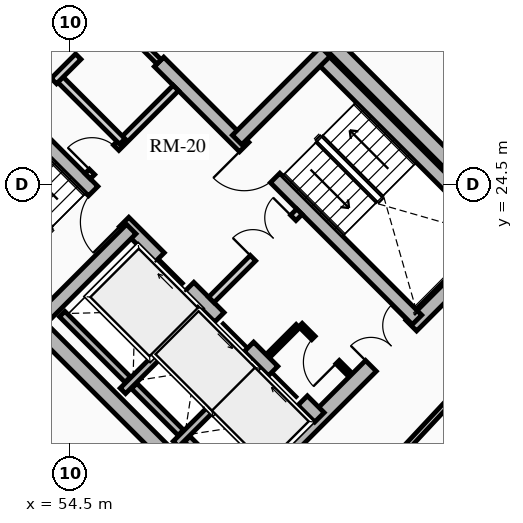
"""IFC4 building model, lengths in metres.
Left out: names, types, materials, properties, quantities, classifications, styles, units other than length and angle.
Written with IfcOpenShell. Run it as: python <this file> out.ifc"""

import sys

from ifc_helpers import new_model, si_unit, direction, frame, frame_2d, origin, place, context, subcontext, project, spatial, rectangle, extrude, source, transform, mapped, element, fill, save


model = new_model("IFC4")
c1 = context("Model", 3, precision=1e-05, world=origin(), true_north=direction((0.0, 1.0)))
c2 = subcontext(c1, "Body", "Model", "MODEL_VIEW")
j1 = project(units=[si_unit("LENGTHUNIT", "METRE"), si_unit("PLANEANGLEUNIT", "RADIAN")], contexts=[c1])
p1 = place(None, origin())
s1 = spatial("IfcSite", under=j1, at=p1, CompositionType="ELEMENT")
p2 = place(p1, origin())
s2 = spatial("IfcBuilding", under=s1, at=p2, CompositionType="ELEMENT")
p3 = place(p2, frame((0.0, 0.0, 214.12)))
s3 = spatial("IfcBuildingStorey", under=s2, at=p3, CompositionType="ELEMENT", Elevation=214.12)
for number, where, z_axis, x_axis in (
    (1, (58.702, 15.732, 0.0), (0.0, 0.0, 1.0), (-0.707, 0.707, 0.0)),
    (2, (66.268, 23.298, 0.0), (0.0, 0.0, 1.0), (-0.707, 0.707, 0.0)),
):
    element("IfcWall", number, at=place(p3, frame(where, z_axis=z_axis, x_axis=x_axis)), inside=s3, PredefinedType="SHEAR", context=c2, shape_type="SweptSolid", body=[
        extrude(rectangle(XDim=14.1, YDim=0.4, at=frame_2d((7.05, 0.0))), origin(), (0.0, 0.0, 1.0), 2.91),
    ])
p4 = place(p3, frame((58.561, 15.873, 0.0), z_axis=(0.0, 0.0, 1.0), x_axis=(0.707106781187, 0.707106781187, 0.0)))
e3 = element("IfcWall", 3, at=p4, inside=s3, PredefinedType="SHEAR", context=c2, shape_type="SweptSolid", body=[
    extrude(rectangle(XDim=10.7, YDim=0.4, at=frame_2d((5.35, 0.0))), origin(), (0.0, 0.0, 1.0), 2.91),
])
m1 = source(origin(), c2, "Body", "SweptSolid", [
    extrude(rectangle(XDim=1.5, YDim=2.02, at=frame_2d((0.75, 1.01))), frame((0.0, 0.21, 0.0), z_axis=(0.0, -1.0, 0.0), x_axis=(1.0, 0.0, 0.0)), (0.0, 0.0, 1.0), 0.42),
])
p5 = place(p4, frame((5.45, 0.0, 0.0)))
e4 = element("IfcOpeningElement", 4, at=p5, cuts=e3, PredefinedType="OPENING", context=c2, shape_type="MappedRepresentation", body=[
    mapped(m1, transform((0.0, 0.0, 0.0), x_axis=(1.0, 0.0, 0.0), y_axis=(0.0, 1.0, 0.0), z_axis=(0.0, 0.0, 1.0), scale=1.0)),
])
p6 = place(p3, frame((48.873, 25.561, 0.0), z_axis=(0.0, 0.0, 1.0), x_axis=(0.707106781187, 0.707106781187, 0.0)))
e5 = element("IfcWall", 5, at=p6, inside=s3, PredefinedType="SHEAR", context=c2, shape_type="SweptSolid", body=[
    extrude(rectangle(XDim=10.7, YDim=0.4, at=frame_2d((5.35, 0.0))), origin(), (0.0, 0.0, 1.0), 2.91),
])
p7 = place(p6, frame((4.6, 0.0, 0.0)))
e6 = element("IfcOpeningElement", 6, at=p7, cuts=e5, PredefinedType="OPENING", context=c2, shape_type="MappedRepresentation", body=[
    mapped(m1, transform((0.0, 0.0, 0.0), x_axis=(1.0, 0.0, 0.0), y_axis=(0.0, 1.0, 0.0), z_axis=(0.0, 0.0, 1.0), scale=1.0)),
])
p8 = place(p3, frame((61.06, 18.373, 0.0), z_axis=(0.0, 0.0, 1.0), x_axis=(-0.707106781187, 0.707106781187, 0.0)))
e7 = element("IfcWall", 7, at=p8, inside=s3, PredefinedType="SHEAR", context=c2, shape_type="SweptSolid", body=[
    extrude(rectangle(XDim=13.7, YDim=0.35, at=frame_2d((6.85, 0.0))), origin(), (0.0, 0.0, 1.0), 2.91),
])
m2 = source(origin(), c2, "Body", "SweptSolid", [
    extrude(rectangle(XDim=1.1, YDim=2.015, at=frame_2d((0.55, 1.007))), frame((0.0, 0.185, 0.0), z_axis=(0.0, -1.0, 0.0), x_axis=(1.0, 0.0, 0.0)), (0.0, 0.0, 1.0), 0.37),
])
p9 = place(p8, frame((4.85, 0.0, 0.0)))
e8 = element("IfcOpeningElement", 8, at=p9, cuts=e7, PredefinedType="OPENING", context=c2, shape_type="MappedRepresentation", body=[
    mapped(m2, transform((0.0, 0.0, 0.0), x_axis=(1.0, 0.0, 0.0), y_axis=(0.0, 1.0, 0.0), z_axis=(0.0, 0.0, 1.0), scale=1.0)),
])
p10 = place(p8, frame((0.625, 0.0, 0.0)))
e9 = element("IfcOpeningElement", 9, at=p10, cuts=e7, PredefinedType="OPENING", context=c2, shape_type="MappedRepresentation", body=[
    mapped(m2, transform((0.0, 0.0, 0.0), x_axis=(1.0, 0.0, 0.0), y_axis=(0.0, 1.0, 0.0), z_axis=(0.0, 0.0, 1.0), scale=1.0)),
])
p11 = place(p8, frame((2.625, 0.0, 0.0)))
e10 = element("IfcOpeningElement", 10, at=p11, cuts=e7, PredefinedType="OPENING", context=c2, shape_type="MappedRepresentation", body=[
    mapped(m2, transform((0.0, 0.0, 0.0), x_axis=(1.0, 0.0, 0.0), y_axis=(0.0, 1.0, 0.0), z_axis=(0.0, 0.0, 1.0), scale=1.0)),
])
m3 = source(origin(), c2, "Body", "SweptSolid", [
    extrude(rectangle(XDim=1.15, YDim=2.02, at=frame_2d((0.575, 1.01))), frame((0.0, 0.185, 0.0), z_axis=(0.0, -1.0, 0.0), x_axis=(1.0, 0.0, 0.0)), (0.0, 0.0, 1.0), 0.37),
])
p12 = place(p8, frame((7.27, 0.0, 0.0)))
e11 = element("IfcOpeningElement", 11, at=p12, cuts=e7, PredefinedType="OPENING", context=c2, shape_type="MappedRepresentation", body=[
    mapped(m3, transform((0.0, 0.0, 0.0), x_axis=(1.0, 0.0, 0.0), y_axis=(0.0, 1.0, 0.0), z_axis=(0.0, 0.0, 1.0), scale=1.0)),
])
p13 = place(p3, frame((63.627, 20.94, 0.0), z_axis=(0.0, 0.0, 1.0), x_axis=(-0.707119496762, 0.707094065383, 0.0)))
e12 = element("IfcWall", 12, at=p13, inside=s3, PredefinedType="SHEAR", context=c2, shape_type="SweptSolid", body=[
    extrude(rectangle(XDim=9.6, YDim=0.35, at=frame_2d((4.8, 0.0))), origin(), (0.0, 0.0, 1.0), 2.91),
])
p14 = place(p13, frame((5.28, 0.0, 0.0)))
e13 = element("IfcOpeningElement", 13, at=p14, cuts=e12, PredefinedType="OPENING", context=c2, shape_type="MappedRepresentation", body=[
    mapped(m3, transform((0.0, 0.0, 0.0), x_axis=(1.0, 0.0, 0.0), y_axis=(0.0, 1.0, 0.0), z_axis=(0.0, 0.0, 1.0), scale=1.0)),
])
p15 = place(p3, frame((53.922, 21.141, 0.0), z_axis=(0.0, 0.0, 1.0), x_axis=(-0.707106781187, 0.707106781187, 0.0)))
e14 = element("IfcWall", 14, at=p15, inside=s3, PredefinedType="SHEAR", context=c2, shape_type="SweptSolid", body=[
    extrude(rectangle(XDim=6.695, YDim=0.35, at=frame_2d((3.348, 0.0))), origin(), (0.0, 0.0, 1.0), 2.91),
])
p16 = place(p3, frame((53.784, 21.003, 0.0), z_axis=(0.0, 0.0, 1.0), x_axis=(0.707106781187, 0.707106781187, 0.0)))
e15 = element("IfcWall", 15, at=p16, inside=s3, PredefinedType="SHEAR", context=c2, shape_type="SweptSolid", body=[
    extrude(rectangle(XDim=3.285, YDim=0.35, at=frame_2d((1.643, 0.0))), origin(), (0.0, 0.0, 1.0), 2.91),
])
p17 = place(p3, frame((65.812, 23.125, 0.0), z_axis=(0.0, 0.0, 1.0), x_axis=(-0.707106781187, 0.707106781187, 0.0)))
e16 = element("IfcWall", 16, at=p17, inside=s3, PredefinedType="SHEAR", context=c2, shape_type="SweptSolid", body=[
    extrude(rectangle(XDim=6.695, YDim=0.35, at=frame_2d((3.348, 0.0))), origin(), (0.0, 0.0, 1.0), 2.91),
])
p18 = place(p3, frame((58.893, 25.674, 0.0), z_axis=(0.0, 0.0, 1.0), x_axis=(0.707106781187, 0.707106781187, 0.0)))
e17 = element("IfcWall", 17, at=p18, inside=s3, PredefinedType="SHEAR", context=c2, shape_type="SweptSolid", body=[
    extrude(rectangle(XDim=3.285, YDim=0.35, at=frame_2d((1.643, 0.0))), origin(), (0.0, 0.0, 1.0), 2.91),
])
p19 = place(p3, frame((55.888, 19.069, 0.0), z_axis=(0.0, 0.0, 1.0), x_axis=(0.707106781187, 0.707106781187, 0.0)))
e18 = element("IfcWall", 18, at=p19, inside=s3, PredefinedType="SHEAR", context=c2, shape_type="SweptSolid", body=[
    extrude(rectangle(XDim=2.97, YDim=0.2, at=frame_2d((1.485, 0.0))), origin(), (0.0, 0.0, 1.0), 2.91),
])
p20 = place(p3, frame((56.015, 19.366, 0.0), z_axis=(0.0, 0.0, 1.0), x_axis=(-0.707106781187, 0.707106781187, 0.0)))
e19 = element("IfcWall", 19, at=p20, inside=s3, PredefinedType="SHEAR", context=c2, shape_type="SweptSolid", body=[
    extrude(rectangle(XDim=2.44, YDim=0.2, at=frame_2d((1.22, 0.0))), origin(), (0.0, 0.0, 1.0), 2.91),
])
p21 = place(p3, frame((57.284, 17.673, 0.0), z_axis=(0.0, 0.0, 1.0), x_axis=(0.707147878904, 0.70706568108, 0.0)))
e20 = element("IfcWall", 20, at=p21, inside=s3, PredefinedType="SHEAR", context=c2, shape_type="SweptSolid", body=[
    extrude(rectangle(XDim=2.97, YDim=0.2, at=frame_2d((1.485, 0.0))), origin(), (0.0, 0.0, 1.0), 2.91),
])
p22 = place(p3, frame((57.412, 17.97, 0.0), z_axis=(0.0, 0.0, 1.0), x_axis=(-0.707106781187, 0.707106781187, 0.0)))
e21 = element("IfcWall", 21, at=p22, inside=s3, PredefinedType="SHEAR", context=c2, shape_type="SweptSolid", body=[
    extrude(rectangle(XDim=1.735, YDim=0.2, at=frame_2d((0.867, 0.0))), origin(), (0.0, 0.0, 1.0), 2.91),
])
p23 = place(p3, frame((58.737, 16.644, 0.0), z_axis=(0.0, 0.0, 1.0), x_axis=(-0.707032117043, 0.707181437447, 0.0)))
e22 = element("IfcWall", 22, at=p23, inside=s3, PredefinedType="SHEAR", context=c2, shape_type="SweptSolid", body=[
    extrude(rectangle(XDim=1.635, YDim=0.2, at=frame_2d((0.817, 0.0))), origin(), (0.0, 0.0, 1.0), 2.91),
])
p24 = place(p3, frame((58.214, 21.467, 0.0), z_axis=(0.0, 0.0, 1.0), x_axis=(0.707106781187, 0.707106781187, 0.0)))
e23 = element("IfcWall", 23, at=p24, inside=s3, PredefinedType="PARTITIONING", context=c2, shape_type="SweptSolid", body=[
    extrude(rectangle(XDim=3.28, YDim=0.2, at=frame_2d((1.64, 0.0))), origin(), (0.0, 0.0, 1.0), 2.685),
])
m4 = source(origin(), c2, "Body", "SweptSolid", [
    extrude(rectangle(XDim=1.5, YDim=2.02, at=frame_2d((0.75, 1.01))), frame((0.0, 0.11, 0.0), z_axis=(0.0, -1.0, 0.0), x_axis=(1.0, 0.0, 0.0)), (0.0, 0.0, 1.0), 0.22),
])
p25 = place(p24, frame((1.55, 0.0, 0.0)))
e24 = element("IfcOpeningElement", 24, at=p25, cuts=e23, PredefinedType="OPENING", context=c2, shape_type="MappedRepresentation", body=[
    mapped(m4, transform((0.0, 0.0, 0.0), x_axis=(1.0, 0.0, 0.0), y_axis=(0.0, 1.0, 0.0), z_axis=(0.0, 0.0, 1.0), scale=1.0)),
])
p26 = place(p3, frame((54.961, 24.719, 0.0), z_axis=(0.0, 0.0, 1.0), x_axis=(0.707106781187, 0.707106781187, 0.0)))
e25 = element("IfcWall", 25, at=p26, inside=s3, PredefinedType="PARTITIONING", context=c2, shape_type="SweptSolid", body=[
    extrude(rectangle(XDim=3.28, YDim=0.2, at=frame_2d((1.64, 0.0))), origin(), (0.0, 0.0, 1.0), 2.685),
])
m5 = source(origin(), c2, "Body", "SweptSolid", [
    extrude(rectangle(XDim=0.9, YDim=2.005, at=frame_2d((0.45, 1.002))), frame((0.0, 0.11, 0.0), z_axis=(0.0, -1.0, 0.0), x_axis=(1.0, 0.0, 0.0)), (0.0, 0.0, 1.0), 0.22),
])
p27 = place(p26, frame((0.16, 0.0, 0.0)))
e26 = element("IfcOpeningElement", 26, at=p27, cuts=e25, PredefinedType="OPENING", context=c2, shape_type="MappedRepresentation", body=[
    mapped(m5, transform((0.0, 0.0, 0.0), x_axis=(1.0, 0.0, 0.0), y_axis=(0.0, 1.0, 0.0), z_axis=(0.0, 0.0, 1.0), scale=1.0)),
])
p28 = place(p3, frame((55.874, 25.631, 0.0), z_axis=(0.0, 0.0, 1.0), x_axis=(-0.707157639372, 0.707055919343, 0.0)))
e27 = element("IfcWall", 27, at=p28, inside=s3, PredefinedType="PARTITIONING", context=c2, shape_type="SweptSolid", body=[
    extrude(rectangle(XDim=2.4, YDim=0.2, at=frame_2d((1.2, 0.0))), origin(), (0.0, 0.0, 1.0), 2.685),
])
p29 = place(p3, frame((53.264, 26.416, 0.0), z_axis=(0.0, 0.0, 1.0), x_axis=(0.707106781187, 0.707106781187, 0.0)))
e28 = element("IfcWall", 28, at=p29, inside=s3, PredefinedType="PARTITIONING", context=c2, shape_type="SweptSolid", body=[
    extrude(rectangle(XDim=3.28, YDim=0.2, at=frame_2d((1.64, 0.0))), origin(), (0.0, 0.0, 1.0), 2.685),
])
m6 = source(origin(), c2, "Body", "SweptSolid", [
    extrude(rectangle(XDim=1.0, YDim=2.015, at=frame_2d((0.5, 1.007))), frame((0.0, 0.11, 0.0), z_axis=(0.0, -1.0, 0.0), x_axis=(1.0, 0.0, 0.0)), (0.0, 0.0, 1.0), 0.22),
])
p30 = place(p29, frame((0.14, 0.0, 0.0)))
e29 = element("IfcOpeningElement", 29, at=p30, cuts=e28, PredefinedType="OPENING", context=c2, shape_type="MappedRepresentation", body=[
    mapped(m6, transform((0.0, 0.0, 0.0), x_axis=(1.0, 0.0, 0.0), y_axis=(0.0, 1.0, 0.0), z_axis=(0.0, 0.0, 1.0), scale=1.0)),
])
p31 = place(p29, frame((2.05, 0.0, 0.0)))
e30 = element("IfcOpeningElement", 30, at=p31, cuts=e28, PredefinedType="OPENING", context=c2, shape_type="MappedRepresentation", body=[
    mapped(m5, transform((0.0, 0.0, 0.0), x_axis=(1.0, 0.0, 0.0), y_axis=(0.0, 1.0, 0.0), z_axis=(0.0, 0.0, 1.0), scale=1.0)),
])
p32 = place(p3, frame((61.835, 19.529, 0.0), z_axis=(0.0, 0.0, 1.0), x_axis=(-0.707174592913, 0.707038962956, 0.0)))
e31 = element("IfcWall", 31, at=p32, inside=s3, PredefinedType="PARTITIONING", context=c2, shape_type="SweptSolid", body=[
    extrude(rectangle(XDim=1.8, YDim=0.125, at=frame_2d((0.9, 0.0))), origin(), (0.0, 0.0, 1.0), 2.685),
])
m7 = source(origin(), c2, "Body", "SweptSolid", [
    extrude(rectangle(XDim=0.9, YDim=2.005, at=frame_2d((0.45, 1.002))), frame((0.0, 0.073, 0.0), z_axis=(0.0, -1.0, 0.0), x_axis=(1.0, 0.0, 0.0)), (0.0, 0.0, 1.0), 0.145),
])
p33 = place(p32, frame((0.42, 0.0, 0.0)))
e32 = element("IfcOpeningElement", 32, at=p33, cuts=e31, PredefinedType="OPENING", context=c2, shape_type="MappedRepresentation", body=[
    mapped(m7, transform((0.0, 0.0, 0.0), x_axis=(1.0, 0.0, 0.0), y_axis=(0.0, 1.0, 0.0), z_axis=(0.0, 0.0, 1.0), scale=1.0)),
])
p34 = place(p3, frame((59.713, 19.996, 0.0), z_axis=(0.0, 0.0, 1.0), x_axis=(0.707217726, 0.706995818963, 0.0)))
e33 = element("IfcWall", 33, at=p34, inside=s3, PredefinedType="PARTITIONING", context=c2, shape_type="SweptSolid", body=[
    extrude(rectangle(XDim=1.1, YDim=0.125, at=frame_2d((0.55, 0.0))), origin(), (0.0, 0.0, 1.0), 2.685),
])
p35 = place(p3, frame((56.839, 27.728, 0.0), z_axis=(0.0, 0.0, 1.0), x_axis=(-0.707106781187, 0.707106781187, 0.0)))
e34 = element("IfcWall", 34, at=p35, inside=s3, PredefinedType="PARTITIONING", context=c2, shape_type="SweptSolid", body=[
    extrude(rectangle(XDim=3.9, YDim=0.16, at=frame_2d((1.95, 0.0))), origin(), (0.0, 0.0, 1.0), 2.685),
])
m8 = source(origin(), c2, "Body", "SweptSolid", [
    extrude(rectangle(XDim=0.9, YDim=2.005, at=frame_2d((0.45, 1.002))), frame((0.0, 0.09, 0.0), z_axis=(0.0, -1.0, 0.0), x_axis=(1.0, 0.0, 0.0)), (0.0, 0.0, 1.0), 0.18),
])
p36 = place(p35, frame((2.2, 0.0, 0.0)))
e35 = element("IfcOpeningElement", 35, at=p36, cuts=e34, PredefinedType="OPENING", context=c2, shape_type="MappedRepresentation", body=[
    mapped(m8, transform((0.0, 0.0, 0.0), x_axis=(1.0, 0.0, 0.0), y_axis=(0.0, 1.0, 0.0), z_axis=(0.0, 0.0, 1.0), scale=1.0)),
])
p37 = place(p3, frame((52.126, 19.126, 0.0), z_axis=(0.0, 0.0, 1.0), x_axis=(0.698979087027, -0.715142108884, 0.0)))
e36 = element("IfcWall", 36, at=p37, inside=s3, PredefinedType="PARTITIONING", context=c2, shape_type="SweptSolid", body=[
    extrude(rectangle(XDim=5.966, YDim=0.15, at=frame_2d((2.983, 0.0))), origin(), (0.0, 0.0, 1.0), 2.322),
])
m9 = source(origin(), c2, "Body", "SweptSolid", [
    extrude(rectangle(XDim=1.05, YDim=2.015, at=frame_2d((0.525, 1.007))), frame((0.0, 0.085, 0.0), z_axis=(0.0, -1.0, 0.0), x_axis=(1.0, 0.0, 0.0)), (0.0, 0.0, 1.0), 0.17),
])
p38 = place(p37, frame((2.458, 0.0, 0.0)))
e37 = element("IfcOpeningElement", 37, at=p38, cuts=e36, PredefinedType="OPENING", context=c2, shape_type="MappedRepresentation", body=[
    mapped(m9, transform((0.0, 0.0, 0.0), x_axis=(1.0, 0.0, 0.0), y_axis=(0.0, 1.0, 0.0), z_axis=(0.0, 0.0, 1.0), scale=1.0)),
])
p39 = place(p3, frame((62.736, 16.924, 0.0), z_axis=(0.0, 0.0, 1.0), x_axis=(0.681946700833, 0.731401871219, 0.0)))
e38 = element("IfcWall", 38, at=p39, inside=s3, PredefinedType="PARTITIONING", context=c2, shape_type="SweptSolid", body=[
    extrude(rectangle(XDim=6.393, YDim=0.15, at=frame_2d((3.196, 0.0))), origin(), (0.0, 0.0, 1.0), 2.255),
])
p40 = place(p3, frame((51.134, 18.134, 0.0), z_axis=(0.0, 0.0, 1.0), x_axis=(0.722450775654, -0.691422357721, 0.0)))
e39 = element("IfcWall", 39, at=p40, inside=s3, PredefinedType="PARTITIONING", context=c2, shape_type="SweptSolid", body=[
    extrude(rectangle(XDim=5.634, YDim=0.125, at=frame_2d((2.817, 0.0))), origin(), (0.0, 0.0, 1.0), 2.322),
])
m10 = source(origin(), c2, "Body", "SweptSolid", [
    extrude(rectangle(XDim=1.1, YDim=2.015, at=frame_2d((0.55, 1.007))), frame((0.0, 0.025, 0.0), z_axis=(0.0, -1.0, 0.0), x_axis=(1.0, 0.0, 0.0)), (0.0, 0.0, 1.0), 0.05),
])
p41 = place(p9, origin())
e40 = element("IfcDoor", 40, at=p41, inside=s3, OperationType="SLIDING_TO_RIGHT", PredefinedType="DOOR", context=c2, shape_type="MappedRepresentation", body=[
    mapped(m10, transform((0.0, 0.0, 0.0), x_axis=(1.0, 0.0, 0.0), y_axis=(0.0, 1.0, 0.0), z_axis=(0.0, 0.0, 1.0), scale=1.0)),
])
fill(e8, e40)
p42 = place(p10, origin())
e41 = element("IfcDoor", 41, at=p42, inside=s3, OperationType="SLIDING_TO_RIGHT", PredefinedType="DOOR", context=c2, shape_type="MappedRepresentation", body=[
    mapped(m10, transform((0.0, 0.0, 0.0), x_axis=(1.0, 0.0, 0.0), y_axis=(0.0, 1.0, 0.0), z_axis=(0.0, 0.0, 1.0), scale=1.0)),
])
fill(e9, e41)
p43 = place(p11, origin())
e42 = element("IfcDoor", 42, at=p43, inside=s3, OperationType="SLIDING_TO_LEFT", PredefinedType="DOOR", context=c2, shape_type="MappedRepresentation", body=[
    mapped(m10, transform((0.0, 0.0, 0.0), x_axis=(1.0, 0.0, 0.0), y_axis=(0.0, 1.0, 0.0), z_axis=(0.0, 0.0, 1.0), scale=1.0)),
])
fill(e10, e42)
m11 = source(origin(), c2, "Body", "SweptSolid", [
    extrude(rectangle(XDim=1.15, YDim=2.02, at=frame_2d((0.575, 1.01))), frame((0.0, 0.025, 0.0), z_axis=(0.0, -1.0, 0.0), x_axis=(1.0, 0.0, 0.0)), (0.0, 0.0, 1.0), 0.05),
])
p44 = place(p12, origin())
e43 = element("IfcDoor", 43, at=p44, inside=s3, OperationType="SINGLE_SWING_LEFT", PredefinedType="DOOR", context=c2, shape_type="MappedRepresentation", body=[
    mapped(m11, transform((0.0, 0.0, 0.0), x_axis=(1.0, 0.0, 0.0), y_axis=(0.0, 1.0, 0.0), z_axis=(0.0, 0.0, 1.0), scale=1.0)),
])
fill(e11, e43)
p45 = place(p14, origin())
e44 = element("IfcDoor", 44, at=p45, inside=s3, OperationType="SINGLE_SWING_RIGHT", PredefinedType="DOOR", context=c2, shape_type="MappedRepresentation", body=[
    mapped(m11, transform((0.0, 0.0, 0.0), x_axis=(1.0, 0.0, 0.0), y_axis=(0.0, 1.0, 0.0), z_axis=(0.0, 0.0, 1.0), scale=1.0)),
])
fill(e13, e44)
m12 = source(origin(), c2, "Body", "SweptSolid", [
    extrude(rectangle(XDim=1.5, YDim=2.02, at=frame_2d((0.75, 1.01))), frame((0.0, 0.025, 0.0), z_axis=(0.0, -1.0, 0.0), x_axis=(1.0, 0.0, 0.0)), (0.0, 0.0, 1.0), 0.05),
])
p46 = place(p5, origin())
e45 = element("IfcDoor", 45, at=p46, inside=s3, OperationType="DOUBLE_DOOR_SINGLE_SWING", PredefinedType="DOOR", context=c2, shape_type="MappedRepresentation", body=[
    mapped(m12, transform((0.0, 0.0, 0.0), x_axis=(1.0, 0.0, 0.0), y_axis=(0.0, 1.0, 0.0), z_axis=(0.0, 0.0, 1.0), scale=1.0)),
])
fill(e4, e45)
p47 = place(p25, origin())
e46 = element("IfcDoor", 46, at=p47, inside=s3, OperationType="DOUBLE_DOOR_SINGLE_SWING", PredefinedType="DOOR", context=c2, shape_type="MappedRepresentation", body=[
    mapped(m12, transform((0.0, 0.0, 0.0), x_axis=(1.0, 0.0, 0.0), y_axis=(0.0, 1.0, 0.0), z_axis=(0.0, 0.0, 1.0), scale=1.0)),
])
fill(e24, e46)
m13 = source(origin(), c2, "Body", "SweptSolid", [
    extrude(rectangle(XDim=0.9, YDim=2.005, at=frame_2d((0.45, 1.002))), frame((0.0, 0.025, 0.0), z_axis=(0.0, -1.0, 0.0), x_axis=(1.0, 0.0, 0.0)), (0.0, 0.0, 1.0), 0.05),
])
p48 = place(p27, origin())
e47 = element("IfcDoor", 47, at=p48, inside=s3, OperationType="SINGLE_SWING_LEFT", PredefinedType="DOOR", context=c2, shape_type="MappedRepresentation", body=[
    mapped(m13, transform((0.0, 0.0, 0.0), x_axis=(1.0, 0.0, 0.0), y_axis=(0.0, 1.0, 0.0), z_axis=(0.0, 0.0, 1.0), scale=1.0)),
])
fill(e26, e47)
m14 = source(origin(), c2, "Body", "SweptSolid", [
    extrude(rectangle(XDim=1.0, YDim=2.015, at=frame_2d((0.5, 1.007))), frame((0.0, 0.025, 0.0), z_axis=(0.0, -1.0, 0.0), x_axis=(1.0, 0.0, 0.0)), (0.0, 0.0, 1.0), 0.05),
])
p49 = place(p30, origin())
e48 = element("IfcDoor", 48, at=p49, inside=s3, OperationType="SINGLE_SWING_RIGHT", PredefinedType="DOOR", context=c2, shape_type="MappedRepresentation", body=[
    mapped(m14, transform((0.0, 0.0, 0.0), x_axis=(1.0, 0.0, 0.0), y_axis=(0.0, 1.0, 0.0), z_axis=(0.0, 0.0, 1.0), scale=1.0)),
])
fill(e29, e48)
p50 = place(p33, origin())
e49 = element("IfcDoor", 49, at=p50, inside=s3, OperationType="SINGLE_SWING_LEFT", PredefinedType="DOOR", context=c2, shape_type="MappedRepresentation", body=[
    mapped(m13, transform((0.0, 0.0, 0.0), x_axis=(1.0, 0.0, 0.0), y_axis=(0.0, 1.0, 0.0), z_axis=(0.0, 0.0, 1.0), scale=1.0)),
])
fill(e32, e49)
p51 = place(p31, origin())
e50 = element("IfcDoor", 50, at=p51, inside=s3, OperationType="SINGLE_SWING_RIGHT", PredefinedType="DOOR", context=c2, shape_type="MappedRepresentation", body=[
    mapped(m13, transform((0.0, 0.0, 0.0), x_axis=(1.0, 0.0, 0.0), y_axis=(0.0, 1.0, 0.0), z_axis=(0.0, 0.0, 1.0), scale=1.0)),
])
fill(e30, e50)
save(model, sys.argv[1])
